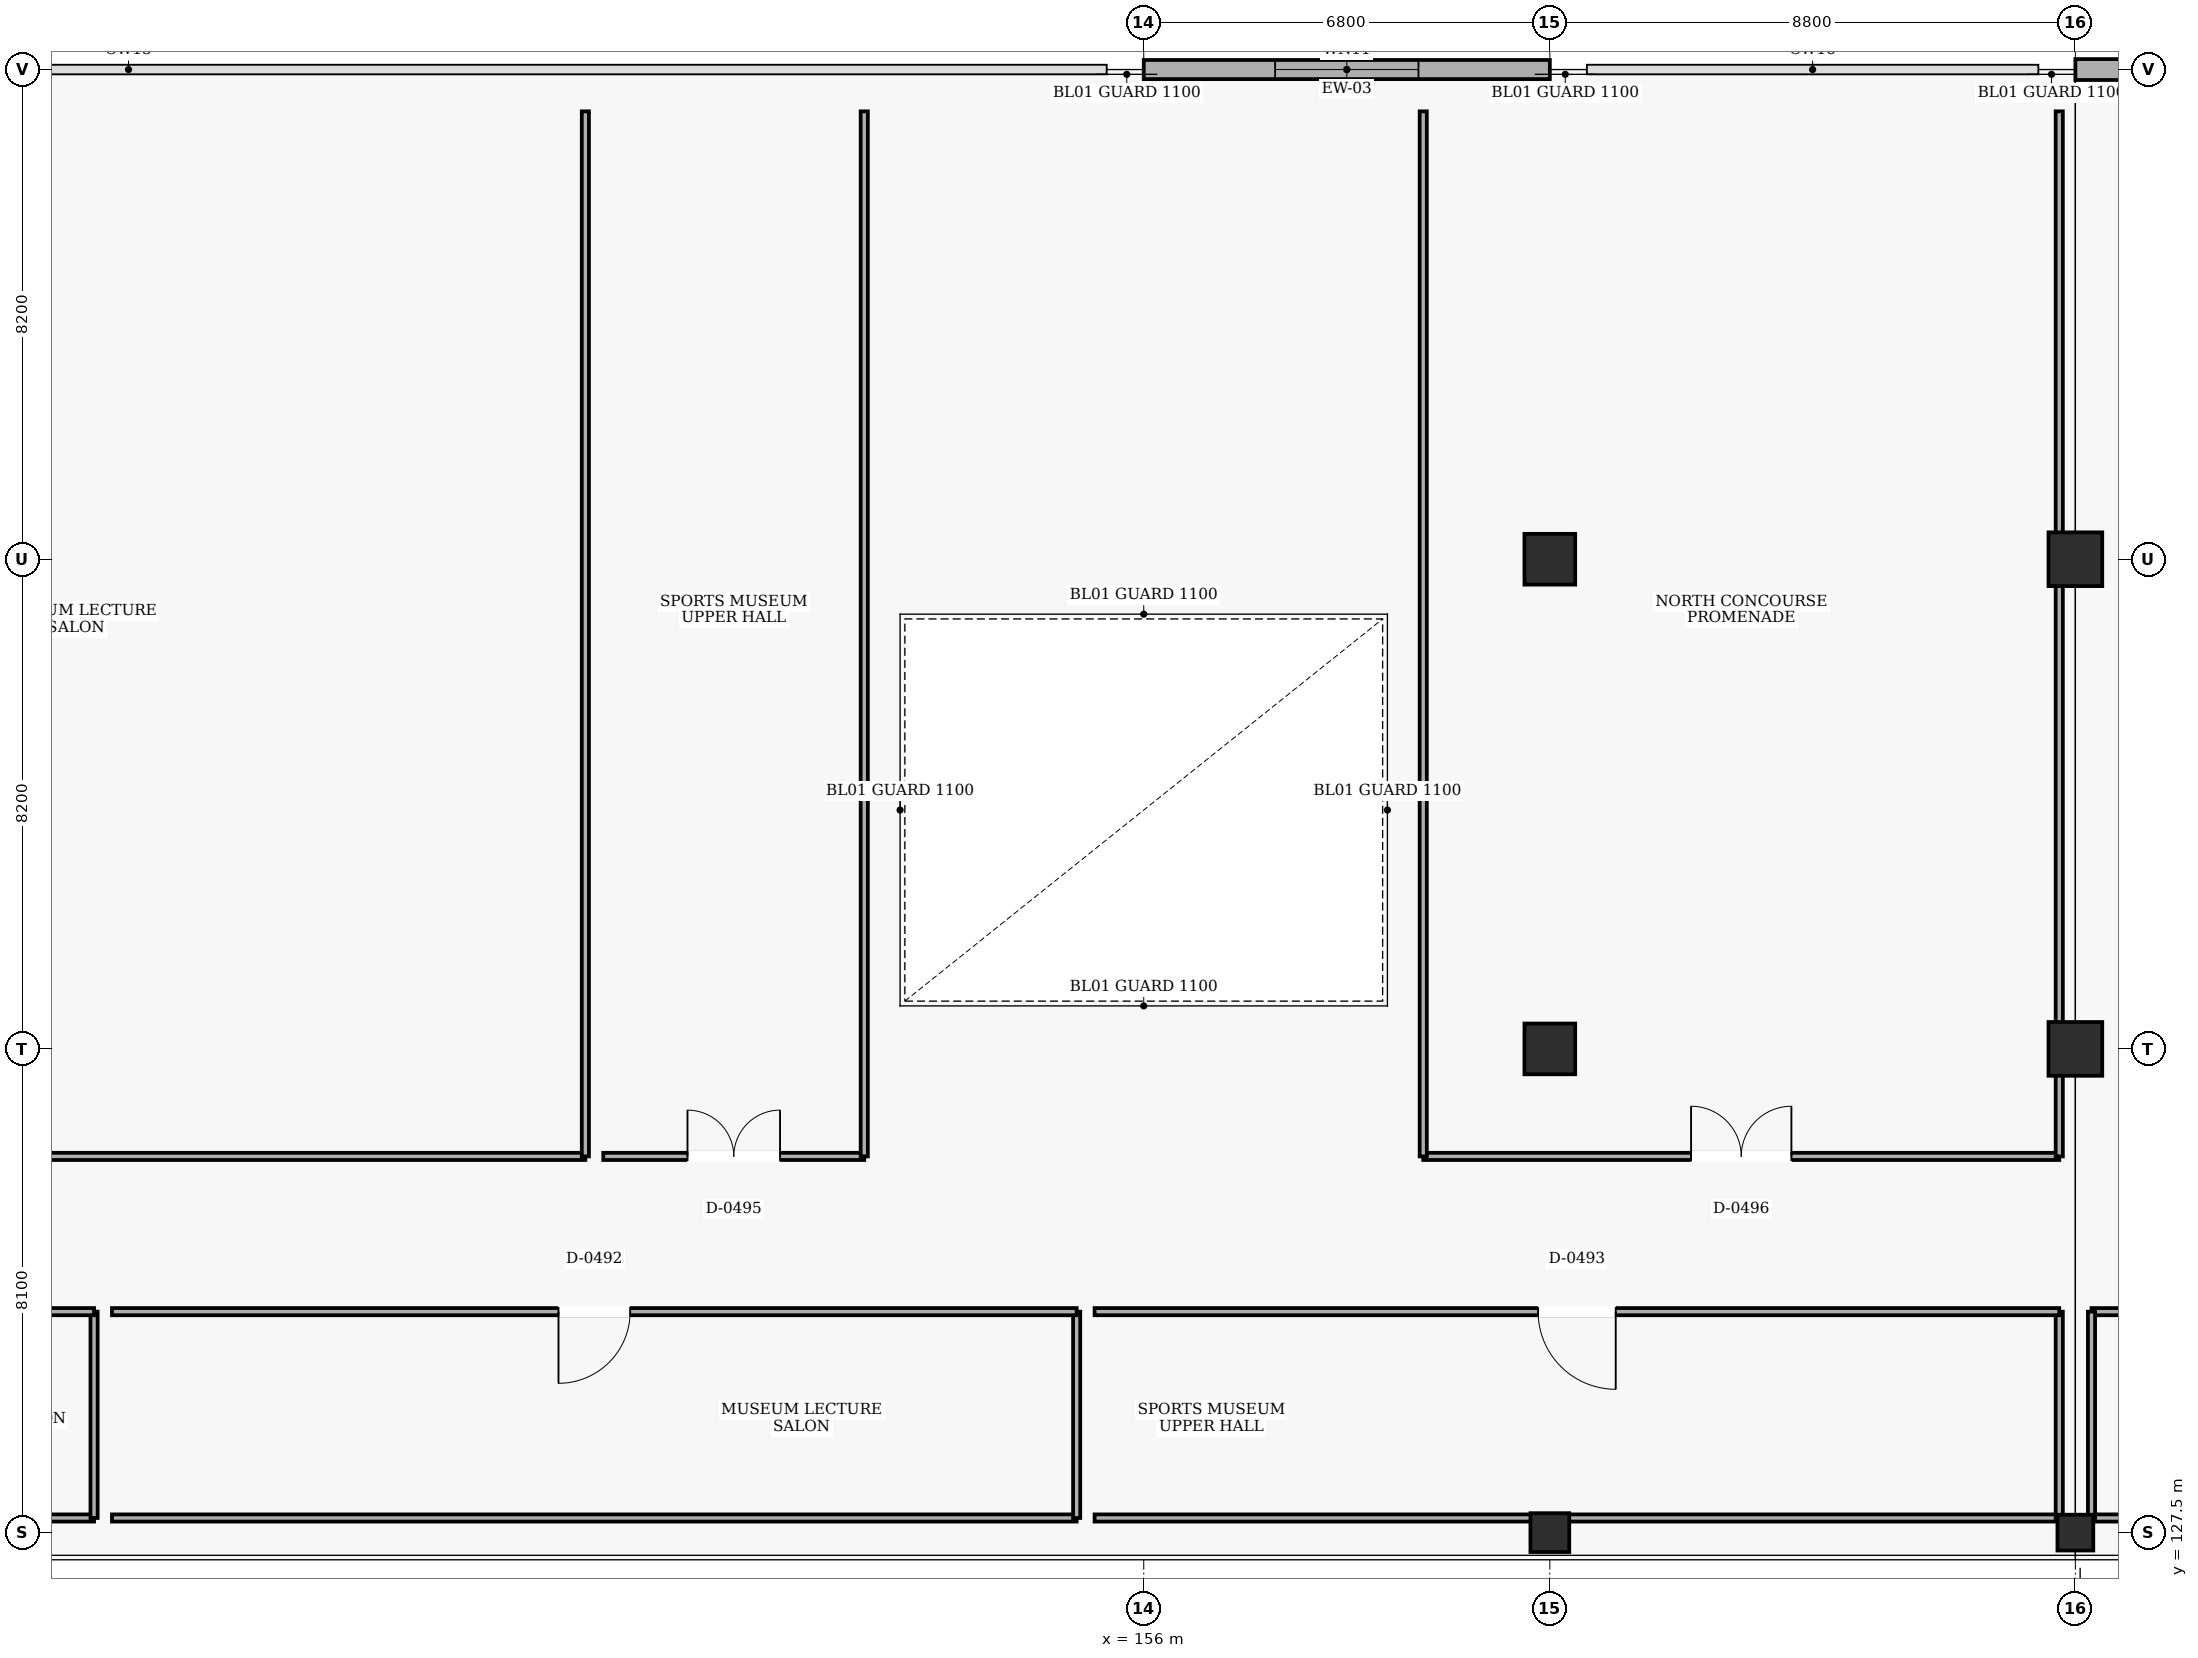
"""IFC4 building model, lengths in metres.
Left out: names, types, materials, properties, quantities, classifications, styles, units other than length and angle.
Written with IfcOpenShell. Run it as: python <this file> out.ifc"""

import sys

from ifc_helpers import new_model, si_unit, direction, frame, frame_2d, origin, origin_2d, place, context, subcontext, project, spatial, rectangle, extrude, element, fill, save


model = new_model("IFC4")
c1 = context("Model", 3, precision=1e-05, world=origin(), true_north=direction((0.0, 1.0)))
c2 = subcontext(c1, "Body", "Model", "MODEL_VIEW")
j1 = project(units=[si_unit("LENGTHUNIT", "METRE"), si_unit("PLANEANGLEUNIT", "RADIAN")], contexts=[c1])
p1 = place(None, origin())
s1 = spatial("IfcSite", under=j1, at=p1, CompositionType="ELEMENT")
p2 = place(p1, origin())
s2 = spatial("IfcBuilding", under=s1, at=p2, CompositionType="ELEMENT")
p3 = place(p2, frame((0.0, 0.0, 5.4)))
s3 = spatial("IfcBuildingStorey", under=s2, at=p3, CompositionType="ELEMENT", Elevation=5.4)
p4 = place(p3, frame((162.8, 127.5, 0.0), z_axis=(0.0, 0.0, 1.0), x_axis=(1.0, 0.0, 0.0)))
e1 = element("IfcColumn", 1, at=p4, inside=s3, PredefinedType="COLUMN", context=c2, shape_type="SweptSolid", body=[
    extrude(rectangle(XDim=0.65, YDim=0.65, at=origin_2d()), origin(), (0.0, 0.0, 1.0), 4.8),
])
for number, where, z_axis, x_axis in (
    (2, (162.8, 135.6, 0.0), (0.0, 0.0, 1.0), (1.0, 0.0, 0.0)),
    (3, (162.8, 143.8, 0.0), (0.0, 0.0, 1.0), (1.0, 0.0, 0.0)),
):
    element("IfcColumn", number, at=place(p3, frame(where, z_axis=z_axis, x_axis=x_axis)), inside=s3, PredefinedType="COLUMN", context=c2, shape_type="SweptSolid", body=[
        extrude(rectangle(XDim=0.85, YDim=0.85, at=origin_2d()), origin(), (0.0, 0.0, 1.0), 4.8),
    ])
p5 = place(p3, frame((171.6, 127.5, 0.0), z_axis=(0.0, 0.0, 1.0), x_axis=(1.0, 0.0, 0.0)))
e4 = element("IfcColumn", 4, at=p5, inside=s3, PredefinedType="COLUMN", context=c2, shape_type="SweptSolid", body=[
    extrude(rectangle(XDim=0.6, YDim=0.6, at=origin_2d()), origin(), (0.0, 0.0, 1.0), 4.8),
])
for number, where, z_axis, x_axis in (
    (5, (171.6, 135.6, 0.0), (0.0, 0.0, 1.0), (1.0, 0.0, 0.0)),
    (6, (171.6, 143.8, 0.0), (0.0, 0.0, 1.0), (1.0, 0.0, 0.0)),
):
    element("IfcColumn", number, at=place(p3, frame(where, z_axis=z_axis, x_axis=x_axis)), inside=s3, PredefinedType="COLUMN", context=c2, shape_type="SweptSolid", body=[
        extrude(rectangle(XDim=0.9, YDim=0.9, at=origin_2d()), origin(), (0.0, 0.0, 1.0), 4.8),
    ])
p6 = place(p3, frame((156.0, 152.0, 0.0), z_axis=(0.0, 0.0, 1.0), x_axis=(1.0, 0.0, 0.0)))
e7 = element("IfcWall", 7, at=p6, inside=s3, PredefinedType="SOLIDWALL", context=c2, shape_type="SweptSolid", body=[
    extrude(rectangle(XDim=6.8, YDim=0.32, at=frame_2d((3.4, 0.0))), origin(), (0.0, 0.0, 1.0), 4.48),
])
p7 = place(p6, frame((2.2, 0.0, 0.9)))
e8 = element("IfcOpeningElement", 8, at=p7, cuts=e7, PredefinedType="OPENING", context=c2, shape_type="SweptSolid", body=[
    extrude(rectangle(XDim=2.4, YDim=1.8, at=frame_2d((1.2, 0.9))), frame((0.0, 0.17, 0.0), z_axis=(0.0, -1.0, 0.0), x_axis=(1.0, 0.0, 0.0)), (0.0, 0.0, 1.0), 0.34),
])
p8 = place(p3, frame((171.6, 152.0, 0.0), z_axis=(0.0, 0.0, 1.0), x_axis=(1.0, 0.0, 0.0)))
e9 = element("IfcWall", 9, at=p8, inside=s3, PredefinedType="SOLIDWALL", context=c2, shape_type="SweptSolid", body=[
    extrude(rectangle(XDim=8.8, YDim=0.35, at=frame_2d((4.4, 0.0))), origin(), (0.0, 0.0, 1.0), 4.48),
])
p9 = place(p8, frame((3.05, 0.0, 0.9)))
e10 = element("IfcOpeningElement", 10, at=p9, cuts=e9, PredefinedType="OPENING", context=c2, shape_type="SweptSolid", body=[
    extrude(rectangle(XDim=2.7, YDim=1.8, at=frame_2d((1.35, 0.9))), frame((0.0, 0.185, 0.0), z_axis=(0.0, -1.0, 0.0), x_axis=(1.0, 0.0, 0.0)), (0.0, 0.0, 1.0), 0.37),
])
p10 = place(p3, frame((122.27, 127.745, 0.0), z_axis=(0.0, 0.0, 1.0), x_axis=(1.0, 0.0, 0.0)))
e11 = element("IfcWall", 11, at=p10, inside=s3, PredefinedType="PARTITIONING", context=c2, shape_type="SweptSolid", body=[
    extrude(rectangle(XDim=16.153, YDim=0.12, at=frame_2d((8.077, 0.0))), origin(), (0.0, 0.0, 1.0), 4.5),
])
p11 = place(p3, frame((138.423, 127.745, 0.0), z_axis=(0.0, 0.0, 1.0), x_axis=(0.0, 1.0, 0.0)))
e12 = element("IfcWall", 12, at=p11, inside=s3, PredefinedType="PARTITIONING", context=c2, shape_type="SweptSolid", body=[
    extrude(rectangle(XDim=3.455, YDim=0.12, at=frame_2d((1.728, 0.0))), origin(), (0.0, 0.0, 1.0), 4.5),
])
p12 = place(p3, frame((138.423, 131.2, 0.0), z_axis=(0.0, 0.0, 1.0), x_axis=(-1.0, 0.0, 0.0)))
e13 = element("IfcWall", 13, at=p12, inside=s3, PredefinedType="PARTITIONING", context=c2, shape_type="SweptSolid", body=[
    extrude(rectangle(XDim=16.153, YDim=0.12, at=frame_2d((8.077, 0.0))), origin(), (0.0, 0.0, 1.0), 4.5),
])
p13 = place(p12, frame((7.517, 0.0, 0.0)))
e14 = element("IfcOpeningElement", 14, at=p13, cuts=e13, PredefinedType="OPENING", context=c2, shape_type="SweptSolid", body=[
    extrude(rectangle(XDim=1.12, YDim=2.15, at=frame_2d((0.56, 1.075))), frame((0.0, 0.07, 0.0), z_axis=(0.0, -1.0, 0.0), x_axis=(1.0, 0.0, 0.0)), (0.0, 0.0, 1.0), 0.14),
])
p14 = place(p3, frame((138.723, 127.745, 0.0), z_axis=(0.0, 0.0, 1.0), x_axis=(1.0, 0.0, 0.0)))
e15 = element("IfcWall", 15, at=p14, inside=s3, PredefinedType="PARTITIONING", context=c2, shape_type="SweptSolid", body=[
    extrude(rectangle(XDim=16.153, YDim=0.12, at=frame_2d((8.077, 0.0))), origin(), (0.0, 0.0, 1.0), 4.5),
])
p15 = place(p3, frame((154.877, 127.745, 0.0), z_axis=(0.0, 0.0, 1.0), x_axis=(0.0, 1.0, 0.0)))
e16 = element("IfcWall", 16, at=p15, inside=s3, PredefinedType="PARTITIONING", context=c2, shape_type="SweptSolid", body=[
    extrude(rectangle(XDim=3.455, YDim=0.12, at=frame_2d((1.728, 0.0))), origin(), (0.0, 0.0, 1.0), 4.5),
])
p16 = place(p3, frame((154.877, 131.2, 0.0), z_axis=(0.0, 0.0, 1.0), x_axis=(-1.0, 0.0, 0.0)))
e17 = element("IfcWall", 17, at=p16, inside=s3, PredefinedType="PARTITIONING", context=c2, shape_type="SweptSolid", body=[
    extrude(rectangle(XDim=16.153, YDim=0.12, at=frame_2d((8.077, 0.0))), origin(), (0.0, 0.0, 1.0), 4.5),
])
p17 = place(p16, frame((7.477, 0.0, 0.0)))
e18 = element("IfcOpeningElement", 18, at=p17, cuts=e17, PredefinedType="OPENING", context=c2, shape_type="SweptSolid", body=[
    extrude(rectangle(XDim=1.2, YDim=2.15, at=frame_2d((0.6, 1.075))), frame((0.0, 0.07, 0.0), z_axis=(0.0, -1.0, 0.0), x_axis=(1.0, 0.0, 0.0)), (0.0, 0.0, 1.0), 0.14),
])
p18 = place(p3, frame((155.177, 127.745, 0.0), z_axis=(0.0, 0.0, 1.0), x_axis=(1.0, 0.0, 0.0)))
e19 = element("IfcWall", 19, at=p18, inside=s3, PredefinedType="PARTITIONING", context=c2, shape_type="SweptSolid", body=[
    extrude(rectangle(XDim=16.153, YDim=0.12, at=frame_2d((8.077, 0.0))), origin(), (0.0, 0.0, 1.0), 3.63),
])
p19 = place(p3, frame((171.33, 127.745, 0.0), z_axis=(0.0, 0.0, 1.0), x_axis=(0.0, 1.0, 0.0)))
e20 = element("IfcWall", 20, at=p19, inside=s3, PredefinedType="PARTITIONING", context=c2, shape_type="SweptSolid", body=[
    extrude(rectangle(XDim=3.455, YDim=0.12, at=frame_2d((1.728, 0.0))), origin(), (0.0, 0.0, 1.0), 3.78),
])
p20 = place(p3, frame((171.33, 131.2, 0.0), z_axis=(0.0, 0.0, 1.0), x_axis=(-1.0, 0.0, 0.0)))
e21 = element("IfcWall", 21, at=p20, inside=s3, PredefinedType="PARTITIONING", context=c2, shape_type="SweptSolid", body=[
    extrude(rectangle(XDim=16.153, YDim=0.12, at=frame_2d((8.077, 0.0))), origin(), (0.0, 0.0, 1.0), 4.5),
])
p21 = place(p20, frame((7.427, 0.0, 0.0)))
e22 = element("IfcOpeningElement", 22, at=p21, cuts=e21, PredefinedType="OPENING", context=c2, shape_type="SweptSolid", body=[
    extrude(rectangle(XDim=1.3, YDim=2.2, at=frame_2d((0.65, 1.1))), frame((0.0, 0.07, 0.0), z_axis=(0.0, -1.0, 0.0), x_axis=(1.0, 0.0, 0.0)), (0.0, 0.0, 1.0), 0.14),
])
p22 = place(p3, frame((122.27, 133.8, 0.0), z_axis=(0.0, 0.0, 1.0), x_axis=(1.0, 0.0, 0.0)))
e23 = element("IfcWall", 23, at=p22, inside=s3, PredefinedType="PARTITIONING", context=c2, shape_type="SweptSolid", body=[
    extrude(rectangle(XDim=24.38, YDim=0.12, at=frame_2d((12.19, 0.0))), origin(), (0.0, 0.0, 1.0), 4.5),
])
p23 = place(p22, frame((11.49, 0.0, 0.0)))
e24 = element("IfcOpeningElement", 24, at=p23, cuts=e23, PredefinedType="OPENING", context=c2, shape_type="SweptSolid", body=[
    extrude(rectangle(XDim=1.4, YDim=2.2, at=frame_2d((0.7, 1.1))), frame((0.0, 0.07, 0.0), z_axis=(0.0, -1.0, 0.0), x_axis=(1.0, 0.0, 0.0)), (0.0, 0.0, 1.0), 0.14),
])
p24 = place(p3, frame((146.65, 133.8, 0.0), z_axis=(0.0, 0.0, 1.0), x_axis=(0.0, 1.0, 0.0)))
e25 = element("IfcWall", 25, at=p24, inside=s3, PredefinedType="PARTITIONING", context=c2, shape_type="SweptSolid", body=[
    extrude(rectangle(XDim=17.5, YDim=0.12, at=frame_2d((8.75, 0.0))), origin(), (0.0, 0.0, 1.0), 4.5),
])
p25 = place(p3, frame((146.95, 133.8, 0.0), z_axis=(0.0, 0.0, 1.0), x_axis=(1.0, 0.0, 0.0)))
e26 = element("IfcWall", 26, at=p25, inside=s3, PredefinedType="PARTITIONING", context=c2, shape_type="SweptSolid", body=[
    extrude(rectangle(XDim=4.37, YDim=0.12, at=frame_2d((2.185, 0.0))), origin(), (0.0, 0.0, 1.0), 4.5),
])
p26 = place(p25, frame((1.41, 0.0, 0.0)))
e27 = element("IfcOpeningElement", 27, at=p26, cuts=e26, PredefinedType="OPENING", context=c2, shape_type="SweptSolid", body=[
    extrude(rectangle(XDim=1.55, YDim=2.2, at=frame_2d((0.775, 1.1))), frame((0.0, 0.07, 0.0), z_axis=(0.0, -1.0, 0.0), x_axis=(1.0, 0.0, 0.0)), (0.0, 0.0, 1.0), 0.14),
])
p27 = place(p3, frame((151.32, 133.8, 0.0), z_axis=(0.0, 0.0, 1.0), x_axis=(0.0, 1.0, 0.0)))
e28 = element("IfcWall", 28, at=p27, inside=s3, PredefinedType="PARTITIONING", context=c2, shape_type="SweptSolid", body=[
    extrude(rectangle(XDim=17.5, YDim=0.12, at=frame_2d((8.75, 0.0))), origin(), (0.0, 0.0, 1.0), 4.5),
])
p28 = place(p3, frame((160.68, 133.8, 0.0), z_axis=(0.0, 0.0, 1.0), x_axis=(1.0, 0.0, 0.0)))
e29 = element("IfcWall", 29, at=p28, inside=s3, PredefinedType="PARTITIONING", context=c2, shape_type="SweptSolid", body=[
    extrude(rectangle(XDim=10.65, YDim=0.12, at=frame_2d((5.325, 0.0))), origin(), (0.0, 0.0, 1.0), 4.5),
])
p29 = place(p28, frame((4.485, 0.0, 0.0)))
e30 = element("IfcOpeningElement", 30, at=p29, cuts=e29, PredefinedType="OPENING", context=c2, shape_type="SweptSolid", body=[
    extrude(rectangle(XDim=1.68, YDim=2.25, at=frame_2d((0.84, 1.125))), frame((0.0, 0.07, 0.0), z_axis=(0.0, -1.0, 0.0), x_axis=(1.0, 0.0, 0.0)), (0.0, 0.0, 1.0), 0.14),
])
p30 = place(p3, frame((171.33, 133.8, 0.0), z_axis=(0.0, 0.0, 1.0), x_axis=(0.0, 1.0, 0.0)))
e31 = element("IfcWall", 31, at=p30, inside=s3, PredefinedType="PARTITIONING", context=c2, shape_type="SweptSolid", body=[
    extrude(rectangle(XDim=17.5, YDim=0.12, at=frame_2d((8.75, 0.0))), origin(), (0.0, 0.0, 1.0), 3.78),
])
p31 = place(p3, frame((160.68, 151.3, 0.0), z_axis=(0.0, 0.0, 1.0), x_axis=(0.0, -1.0, 0.0)))
e32 = element("IfcWall", 32, at=p31, inside=s3, PredefinedType="PARTITIONING", context=c2, shape_type="SweptSolid", body=[
    extrude(rectangle(XDim=17.5, YDim=0.12, at=frame_2d((8.75, 0.0))), origin(), (0.0, 0.0, 1.0), 4.5),
])
p32 = place(p3, frame((171.87, 127.745, 0.0), z_axis=(0.0, 0.0, 1.0), x_axis=(1.0, 0.0, 0.0)))
e33 = element("IfcWall", 33, at=p32, inside=s3, PredefinedType="PARTITIONING", context=c2, shape_type="SweptSolid", body=[
    extrude(rectangle(XDim=22.967, YDim=0.12, at=frame_2d((11.484, 0.0))), origin(), (0.0, 0.0, 1.0), 3.53),
])
p33 = place(p3, frame((194.837, 131.2, 0.0), z_axis=(0.0, 0.0, 1.0), x_axis=(-1.0, 0.0, 0.0)))
e34 = element("IfcWall", 34, at=p33, inside=s3, PredefinedType="PARTITIONING", context=c2, shape_type="SweptSolid", body=[
    extrude(rectangle(XDim=22.967, YDim=0.12, at=frame_2d((11.484, 0.0))), origin(), (0.0, 0.0, 1.0), 4.5),
])
p34 = place(p33, frame((10.604, 0.0, 0.0)))
e35 = element("IfcOpeningElement", 35, at=p34, cuts=e34, PredefinedType="OPENING", context=c2, shape_type="SweptSolid", body=[
    extrude(rectangle(XDim=1.76, YDim=2.25, at=frame_2d((0.88, 1.125))), frame((0.0, 0.07, 0.0), z_axis=(0.0, -1.0, 0.0), x_axis=(1.0, 0.0, 0.0)), (0.0, 0.0, 1.0), 0.14),
])
p35 = place(p3, frame((171.87, 131.2, 0.0), z_axis=(0.0, 0.0, 1.0), x_axis=(0.0, -1.0, 0.0)))
e36 = element("IfcWall", 36, at=p35, inside=s3, PredefinedType="PARTITIONING", context=c2, shape_type="SweptSolid", body=[
    extrude(rectangle(XDim=3.455, YDim=0.12, at=frame_2d((1.728, 0.0))), origin(), (0.0, 0.0, 1.0), 3.78),
])
p36 = place(p7, origin())
e37 = element("IfcWindow", 37, at=p36, inside=s3, PartitioningType="SINGLE_PANEL", PredefinedType="WINDOW", context=c2, shape_type="SweptSolid", body=[
    extrude(rectangle(XDim=2.4, YDim=1.8, at=frame_2d((1.2, 0.9))), frame((0.0, 0.03, 0.0), z_axis=(0.0, -1.0, 0.0), x_axis=(1.0, 0.0, 0.0)), (0.0, 0.0, 1.0), 0.06),
])
fill(e8, e37)
p37 = place(p17, origin())
e38 = element("IfcDoor", 38, at=p37, inside=s3, OperationType="SINGLE_SWING_RIGHT", PredefinedType="DOOR", context=c2, shape_type="SweptSolid", body=[
    extrude(rectangle(XDim=1.2, YDim=2.15, at=frame_2d((0.6, 1.075))), frame((0.0, 0.025, 0.0), z_axis=(0.0, -1.0, 0.0), x_axis=(1.0, 0.0, 0.0)), (0.0, 0.0, 1.0), 0.05),
])
fill(e18, e38)
p38 = place(p21, origin())
e39 = element("IfcDoor", 39, at=p38, inside=s3, OperationType="SINGLE_SWING_LEFT", PredefinedType="DOOR", context=c2, shape_type="SweptSolid", body=[
    extrude(rectangle(XDim=1.3, YDim=2.2, at=frame_2d((0.65, 1.1))), frame((0.0, 0.025, 0.0), z_axis=(0.0, -1.0, 0.0), x_axis=(1.0, 0.0, 0.0)), (0.0, 0.0, 1.0), 0.05),
])
fill(e22, e39)
p39 = place(p26, origin())
e40 = element("IfcDoor", 40, at=p39, inside=s3, OperationType="DOUBLE_DOOR_SINGLE_SWING", PredefinedType="DOOR", context=c2, shape_type="SweptSolid", body=[
    extrude(rectangle(XDim=1.55, YDim=2.2, at=frame_2d((0.775, 1.1))), frame((0.0, 0.025, 0.0), z_axis=(0.0, -1.0, 0.0), x_axis=(1.0, 0.0, 0.0)), (0.0, 0.0, 1.0), 0.05),
])
fill(e27, e40)
p40 = place(p29, origin())
e41 = element("IfcDoor", 41, at=p40, inside=s3, OperationType="DOUBLE_DOOR_SINGLE_SWING", PredefinedType="DOOR", context=c2, shape_type="SweptSolid", body=[
    extrude(rectangle(XDim=1.68, YDim=2.25, at=frame_2d((0.84, 1.125))), frame((0.0, 0.025, 0.0), z_axis=(0.0, -1.0, 0.0), x_axis=(1.0, 0.0, 0.0)), (0.0, 0.0, 1.0), 0.05),
])
fill(e30, e41)
save(model, sys.argv[1])
